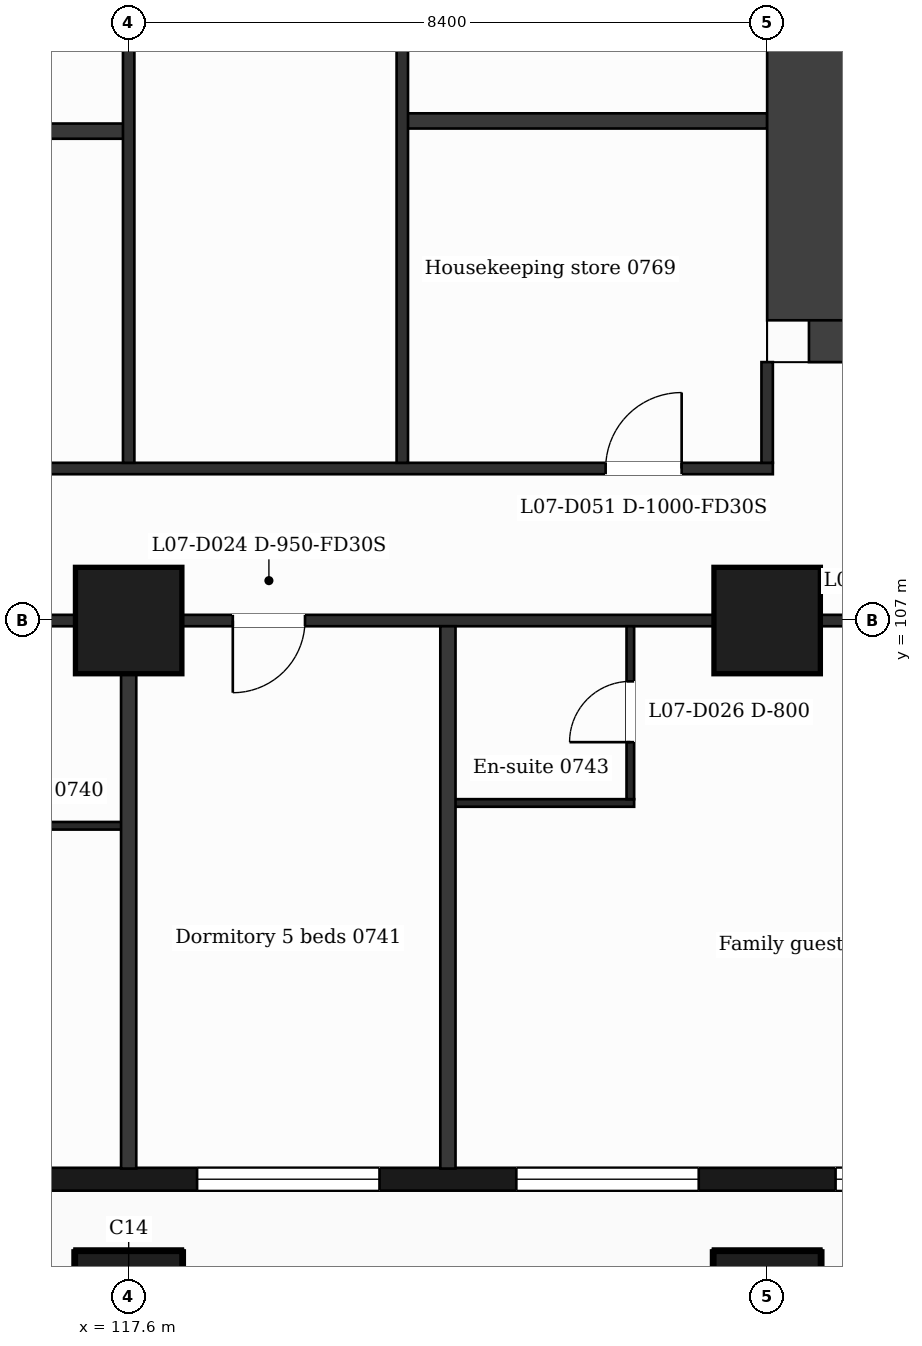
"""IFC4 building model, lengths in metres.
Left out: names, types, materials, properties, quantities, classifications, styles, units other than length and angle.
Written with IfcOpenShell. Run it as: python <this file> out.ifc"""

import sys

from ifc_helpers import new_model, si_unit, direction, frame, frame_2d, origin, origin_2d, place, context, subcontext, project, spatial, rectangle, extrude, element, fill, save


model = new_model("IFC4")
c1 = context("Model", 3, precision=1e-05, world=origin(), true_north=direction((0.0, 1.0)))
c2 = subcontext(c1, "Body", "Model", "MODEL_VIEW")
j1 = project(units=[si_unit("LENGTHUNIT", "METRE"), si_unit("PLANEANGLEUNIT", "RADIAN")], contexts=[c1])
p1 = place(None, origin())
s1 = spatial("IfcSite", under=j1, at=p1, CompositionType="ELEMENT")
p2 = place(p1, origin())
s2 = spatial("IfcBuilding", under=s1, at=p2, CompositionType="ELEMENT")
p3 = place(p2, frame((0.0, 0.0, 42.5)))
s3 = spatial("IfcBuildingStorey", under=s2, at=p3, CompositionType="ELEMENT", Elevation=42.5)
p4 = place(p3, frame((140.502, 110.95, 0.0), z_axis=(0.0, 0.0, 1.0), x_axis=(-1.0, 0.0, 0.0)))
e1 = element("IfcWall", 1, at=p4, inside=s3, PredefinedType="SHEAR", context=c2, shape_type="SweptSolid", body=[
    extrude(rectangle(XDim=13.952, YDim=1.1, at=frame_2d((6.976, 0.0))), origin(), (0.0, 0.0, 1.0), 3.5),
])
p5 = place(p4, frame((6.804, 0.0, 0.0)))
e2 = element("IfcOpeningElement", 2, at=p5, cuts=e1, PredefinedType="OPENING", context=c2, shape_type="SweptSolid", body=[
    extrude(rectangle(XDim=1.4, YDim=2.1, at=frame_2d((0.7, 1.05))), frame((0.0, 0.56, 0.0), z_axis=(0.0, -1.0, 0.0), x_axis=(1.0, 0.0, 0.0)), (0.0, 0.0, 1.0), 1.12),
])
p6 = place(p3, frame((126.55, 110.95, 0.0), z_axis=(0.0, 0.0, 1.0), x_axis=(0.0, 1.0, 0.0)))
e3 = element("IfcWall", 3, at=p6, inside=s3, PredefinedType="SHEAR", context=c2, shape_type="SweptSolid", body=[
    extrude(rectangle(XDim=20.9, YDim=1.1, at=frame_2d((10.45, 0.0))), origin(), (0.0, 0.0, 1.0), 3.5),
])
p7 = place(p6, frame((11.8, 0.0, 0.0)))
e4 = element("IfcOpeningElement", 4, at=p7, cuts=e3, PredefinedType="OPENING", context=c2, shape_type="SweptSolid", body=[
    extrude(rectangle(XDim=1.4, YDim=2.1, at=frame_2d((0.7, 1.05))), frame((0.0, 0.56, 0.0), z_axis=(0.0, -1.0, 0.0), x_axis=(1.0, 0.0, 0.0)), (0.0, 0.0, 1.0), 1.12),
])
for number, where, z_axis, x_axis in (
    (5, (117.6, 98.0, 0.0), (0.0, 0.0, 1.0), (1.0, 0.0, 0.0)),
    (6, (126.0, 98.0, 0.0), (0.0, 0.0, 1.0), (1.0, 0.0, 0.0)),
    (7, (117.6, 107.0, 0.0), (0.0, 0.0, 1.0), (1.0, 0.0, 0.0)),
    (8, (126.0, 107.0, 0.0), (0.0, 0.0, 1.0), (1.0, 0.0, 0.0)),
):
    element("IfcColumn", number, at=place(p3, frame(where, z_axis=z_axis, x_axis=x_axis)), inside=s3, PredefinedType="COLUMN", context=c2, shape_type="SweptSolid", body=[
        extrude(rectangle(XDim=1.4, YDim=1.4, at=origin_2d()), origin(), (0.0, 0.0, 1.0), 3.5),
    ])
p8 = place(p3, frame((89.85, 99.65, 0.0), z_axis=(0.0, 0.0, 1.0), x_axis=(1.0, 0.0, 0.0)))
e9 = element("IfcWall", 9, at=p8, inside=s3, PredefinedType="SOLIDWALL", context=c2, shape_type="SweptSolid", body=[
    extrude(rectangle(XDim=47.25, YDim=0.3, at=frame_2d((23.625, 0.0))), origin(), (0.0, 0.0, 1.0), 3.18),
])
p9 = place(p8, frame((0.725, 0.0, 0.9)))
e10 = element("IfcOpeningElement", 10, at=p9, cuts=e9, PredefinedType="OPENING", context=c2, shape_type="SweptSolid", body=[
    extrude(rectangle(XDim=1.2, YDim=2.1, at=frame_2d((0.6, 1.05))), frame((0.0, 0.16, 0.0), z_axis=(0.0, -1.0, 0.0), x_axis=(1.0, 0.0, 0.0)), (0.0, 0.0, 1.0), 0.32),
])
p10 = place(p8, frame((3.45, 0.0, 0.9)))
e11 = element("IfcOpeningElement", 11, at=p10, cuts=e9, PredefinedType="OPENING", context=c2, shape_type="SweptSolid", body=[
    extrude(rectangle(XDim=2.4, YDim=2.1, at=frame_2d((1.2, 1.05))), frame((0.0, 0.16, 0.0), z_axis=(0.0, -1.0, 0.0), x_axis=(1.0, 0.0, 0.0)), (0.0, 0.0, 1.0), 0.32),
])
p11 = place(p8, frame((7.35, 0.0, 0.0)))
e12 = element("IfcOpeningElement", 12, at=p11, cuts=e9, PredefinedType="OPENING", context=c2, shape_type="SweptSolid", body=[
    extrude(rectangle(XDim=1.2, YDim=2.4, at=frame_2d((0.6, 1.2))), frame((0.0, 0.16, 0.0), z_axis=(0.0, -1.0, 0.0), x_axis=(1.0, 0.0, 0.0)), (0.0, 0.0, 1.0), 0.32),
])
p12 = place(p8, frame((9.15, 0.0, 0.9)))
e13 = element("IfcOpeningElement", 13, at=p12, cuts=e9, PredefinedType="OPENING", context=c2, shape_type="SweptSolid", body=[
    extrude(rectangle(XDim=1.2, YDim=2.1, at=frame_2d((0.6, 1.05))), frame((0.0, 0.16, 0.0), z_axis=(0.0, -1.0, 0.0), x_axis=(1.0, 0.0, 0.0)), (0.0, 0.0, 1.0), 0.32),
])
p13 = place(p8, frame((11.85, 0.0, 0.9)))
e14 = element("IfcOpeningElement", 14, at=p13, cuts=e9, PredefinedType="OPENING", context=c2, shape_type="SweptSolid", body=[
    extrude(rectangle(XDim=2.4, YDim=2.1, at=frame_2d((1.2, 1.05))), frame((0.0, 0.16, 0.0), z_axis=(0.0, -1.0, 0.0), x_axis=(1.0, 0.0, 0.0)), (0.0, 0.0, 1.0), 0.32),
])
p14 = place(p8, frame((16.05, 0.0, 0.9)))
e15 = element("IfcOpeningElement", 15, at=p14, cuts=e9, PredefinedType="OPENING", context=c2, shape_type="SweptSolid", body=[
    extrude(rectangle(XDim=2.4, YDim=2.1, at=frame_2d((1.2, 1.05))), frame((0.0, 0.16, 0.0), z_axis=(0.0, -1.0, 0.0), x_axis=(1.0, 0.0, 0.0)), (0.0, 0.0, 1.0), 0.32),
])
p15 = place(p8, frame((20.85, 0.0, 0.9)))
e16 = element("IfcOpeningElement", 16, at=p15, cuts=e9, PredefinedType="OPENING", context=c2, shape_type="SweptSolid", body=[
    extrude(rectangle(XDim=1.2, YDim=2.1, at=frame_2d((0.6, 1.05))), frame((0.0, 0.16, 0.0), z_axis=(0.0, -1.0, 0.0), x_axis=(1.0, 0.0, 0.0)), (0.0, 0.0, 1.0), 0.32),
])
p16 = place(p8, frame((25.05, 0.0, 0.9)))
e17 = element("IfcOpeningElement", 17, at=p16, cuts=e9, PredefinedType="OPENING", context=c2, shape_type="SweptSolid", body=[
    extrude(rectangle(XDim=1.2, YDim=2.1, at=frame_2d((0.6, 1.05))), frame((0.0, 0.16, 0.0), z_axis=(0.0, -1.0, 0.0), x_axis=(1.0, 0.0, 0.0)), (0.0, 0.0, 1.0), 0.32),
])
p17 = place(p8, frame((28.65, 0.0, 0.9)))
e18 = element("IfcOpeningElement", 18, at=p17, cuts=e9, PredefinedType="OPENING", context=c2, shape_type="SweptSolid", body=[
    extrude(rectangle(XDim=2.4, YDim=2.1, at=frame_2d((1.2, 1.05))), frame((0.0, 0.16, 0.0), z_axis=(0.0, -1.0, 0.0), x_axis=(1.0, 0.0, 0.0)), (0.0, 0.0, 1.0), 0.32),
])
p18 = place(p8, frame((32.85, 0.0, 0.9)))
e19 = element("IfcOpeningElement", 19, at=p18, cuts=e9, PredefinedType="OPENING", context=c2, shape_type="SweptSolid", body=[
    extrude(rectangle(XDim=2.4, YDim=2.1, at=frame_2d((1.2, 1.05))), frame((0.0, 0.16, 0.0), z_axis=(0.0, -1.0, 0.0), x_axis=(1.0, 0.0, 0.0)), (0.0, 0.0, 1.0), 0.32),
])
p19 = place(p8, frame((37.05, 0.0, 0.9)))
e20 = element("IfcOpeningElement", 20, at=p19, cuts=e9, PredefinedType="OPENING", context=c2, shape_type="SweptSolid", body=[
    extrude(rectangle(XDim=2.4, YDim=2.1, at=frame_2d((1.2, 1.05))), frame((0.0, 0.16, 0.0), z_axis=(0.0, -1.0, 0.0), x_axis=(1.0, 0.0, 0.0)), (0.0, 0.0, 1.0), 0.32),
])
p20 = place(p8, frame((41.25, 0.0, 0.9)))
e21 = element("IfcOpeningElement", 21, at=p20, cuts=e9, PredefinedType="OPENING", context=c2, shape_type="SweptSolid", body=[
    extrude(rectangle(XDim=2.4, YDim=2.1, at=frame_2d((1.2, 1.05))), frame((0.0, 0.16, 0.0), z_axis=(0.0, -1.0, 0.0), x_axis=(1.0, 0.0, 0.0)), (0.0, 0.0, 1.0), 0.32),
])
p21 = place(p8, frame((45.25, 0.0, 0.9)))
e22 = element("IfcOpeningElement", 22, at=p21, cuts=e9, PredefinedType="OPENING", context=c2, shape_type="SweptSolid", body=[
    extrude(rectangle(XDim=1.2, YDim=2.1, at=frame_2d((0.6, 1.05))), frame((0.0, 0.16, 0.0), z_axis=(0.0, -1.0, 0.0), x_axis=(1.0, 0.0, 0.0)), (0.0, 0.0, 1.0), 0.32),
])
p22 = place(p3, frame((115.15, 104.3, 0.0), z_axis=(0.0, 0.0, 1.0), x_axis=(1.0, 0.0, 0.0)))
e23 = element("IfcWall", 23, at=p22, inside=s3, PredefinedType="PARTITIONING", context=c2, shape_type="SweptSolid", body=[
    extrude(rectangle(XDim=2.45, YDim=0.1, at=frame_2d((1.225, 0.0))), origin(), (0.0, 0.0, 1.0), 3.18),
])
p23 = place(p3, frame((121.8, 104.6, 0.0), z_axis=(0.0, 0.0, 1.0), x_axis=(1.0, 0.0, 0.0)))
e24 = element("IfcWall", 24, at=p23, inside=s3, PredefinedType="PARTITIONING", context=c2, shape_type="SweptSolid", body=[
    extrude(rectangle(XDim=2.45, YDim=0.1, at=frame_2d((1.225, 0.0))), origin(), (0.0, 0.0, 1.0), 3.18),
])
p24 = place(p3, frame((87.018, 107.0, 0.0), z_axis=(0.0, 0.0, 1.0), x_axis=(1.0, 0.0, 0.0)))
e25 = element("IfcWall", 25, at=p24, inside=s3, PredefinedType="PARTITIONING", context=c2, shape_type="SweptSolid", body=[
    extrude(rectangle(XDim=52.765, YDim=0.15, at=frame_2d((26.382, 0.0))), origin(), (0.0, 0.0, 1.0), 3.18),
])
p25 = place(p24, frame((1.032, 0.0, 0.0)))
e26 = element("IfcOpeningElement", 26, at=p25, cuts=e25, PredefinedType="OPENING", context=c2, shape_type="SweptSolid", body=[
    extrude(rectangle(XDim=0.95, YDim=2.1, at=frame_2d((0.475, 1.05))), frame((0.0, 0.085, 0.0), z_axis=(0.0, -1.0, 0.0), x_axis=(1.0, 0.0, 0.0)), (0.0, 0.0, 1.0), 0.17),
])
p26 = place(p24, frame((6.369, 0.0, 0.0)))
e27 = element("IfcOpeningElement", 27, at=p26, cuts=e25, PredefinedType="OPENING", context=c2, shape_type="SweptSolid", body=[
    extrude(rectangle(XDim=0.95, YDim=2.1, at=frame_2d((0.475, 1.05))), frame((0.0, 0.085, 0.0), z_axis=(0.0, -1.0, 0.0), x_axis=(1.0, 0.0, 0.0)), (0.0, 0.0, 1.0), 0.17),
])
p27 = place(p24, frame((10.952, 0.0, 0.0)))
e28 = element("IfcOpeningElement", 28, at=p27, cuts=e25, PredefinedType="OPENING", context=c2, shape_type="SweptSolid", body=[
    extrude(rectangle(XDim=0.95, YDim=2.1, at=frame_2d((0.475, 1.05))), frame((0.0, 0.085, 0.0), z_axis=(0.0, -1.0, 0.0), x_axis=(1.0, 0.0, 0.0)), (0.0, 0.0, 1.0), 0.17),
])
p28 = place(p24, frame((16.045, 0.0, 0.0)))
e29 = element("IfcOpeningElement", 29, at=p28, cuts=e25, PredefinedType="OPENING", context=c2, shape_type="SweptSolid", body=[
    extrude(rectangle(XDim=0.95, YDim=2.1, at=frame_2d((0.475, 1.05))), frame((0.0, 0.085, 0.0), z_axis=(0.0, -1.0, 0.0), x_axis=(1.0, 0.0, 0.0)), (0.0, 0.0, 1.0), 0.17),
])
p29 = place(p24, frame((20.245, 0.0, 0.0)))
e30 = element("IfcOpeningElement", 30, at=p29, cuts=e25, PredefinedType="OPENING", context=c2, shape_type="SweptSolid", body=[
    extrude(rectangle(XDim=0.95, YDim=2.1, at=frame_2d((0.475, 1.05))), frame((0.0, 0.085, 0.0), z_axis=(0.0, -1.0, 0.0), x_axis=(1.0, 0.0, 0.0)), (0.0, 0.0, 1.0), 0.17),
])
p30 = place(p24, frame((24.969, 0.0, 0.0)))
e31 = element("IfcOpeningElement", 31, at=p30, cuts=e25, PredefinedType="OPENING", context=c2, shape_type="SweptSolid", body=[
    extrude(rectangle(XDim=0.95, YDim=2.1, at=frame_2d((0.475, 1.05))), frame((0.0, 0.085, 0.0), z_axis=(0.0, -1.0, 0.0), x_axis=(1.0, 0.0, 0.0)), (0.0, 0.0, 1.0), 0.17),
])
p31 = place(p24, frame((26.807, 0.0, 0.0)))
e32 = element("IfcOpeningElement", 32, at=p31, cuts=e25, PredefinedType="OPENING", context=c2, shape_type="SweptSolid", body=[
    extrude(rectangle(XDim=0.95, YDim=2.1, at=frame_2d((0.475, 1.05))), frame((0.0, 0.085, 0.0), z_axis=(0.0, -1.0, 0.0), x_axis=(1.0, 0.0, 0.0)), (0.0, 0.0, 1.0), 0.17),
])
p32 = place(p24, frame((31.952, 0.0, 0.0)))
e33 = element("IfcOpeningElement", 33, at=p32, cuts=e25, PredefinedType="OPENING", context=c2, shape_type="SweptSolid", body=[
    extrude(rectangle(XDim=0.95, YDim=2.1, at=frame_2d((0.475, 1.05))), frame((0.0, 0.085, 0.0), z_axis=(0.0, -1.0, 0.0), x_axis=(1.0, 0.0, 0.0)), (0.0, 0.0, 1.0), 0.17),
])
p33 = place(p24, frame((40.795, 0.0, 0.0)))
e34 = element("IfcOpeningElement", 34, at=p33, cuts=e25, PredefinedType="OPENING", context=c2, shape_type="SweptSolid", body=[
    extrude(rectangle(XDim=0.95, YDim=2.1, at=frame_2d((0.475, 1.05))), frame((0.0, 0.085, 0.0), z_axis=(0.0, -1.0, 0.0), x_axis=(1.0, 0.0, 0.0)), (0.0, 0.0, 1.0), 0.17),
])
p34 = place(p24, frame((43.644, 0.0, 0.0)))
e35 = element("IfcOpeningElement", 35, at=p34, cuts=e25, PredefinedType="OPENING", context=c2, shape_type="SweptSolid", body=[
    extrude(rectangle(XDim=0.95, YDim=2.1, at=frame_2d((0.475, 1.05))), frame((0.0, 0.085, 0.0), z_axis=(0.0, -1.0, 0.0), x_axis=(1.0, 0.0, 0.0)), (0.0, 0.0, 1.0), 0.17),
])
p35 = place(p24, frame((48.767, 0.0, 0.0)))
e36 = element("IfcOpeningElement", 36, at=p35, cuts=e25, PredefinedType="OPENING", context=c2, shape_type="SweptSolid", body=[
    extrude(rectangle(XDim=0.95, YDim=2.1, at=frame_2d((0.475, 1.05))), frame((0.0, 0.085, 0.0), z_axis=(0.0, -1.0, 0.0), x_axis=(1.0, 0.0, 0.0)), (0.0, 0.0, 1.0), 0.17),
])
p36 = place(p3, frame((100.725, 109.0, 0.0), z_axis=(0.0, 0.0, 1.0), x_axis=(1.0, 0.0, 0.0)))
e37 = element("IfcWall", 37, at=p36, inside=s3, PredefinedType="PARTITIONING", context=c2, shape_type="SweptSolid", body=[
    extrude(rectangle(XDim=25.35, YDim=0.15, at=frame_2d((12.675, 0.0))), origin(), (0.0, 0.0, 1.0), 3.18),
])
p37 = place(p36, frame((1.2, 0.0, 0.0)))
e38 = element("IfcOpeningElement", 38, at=p37, cuts=e37, PredefinedType="OPENING", context=c2, shape_type="SweptSolid", body=[
    extrude(rectangle(XDim=1.0, YDim=2.1, at=frame_2d((0.5, 1.05))), frame((0.0, 0.085, 0.0), z_axis=(0.0, -1.0, 0.0), x_axis=(1.0, 0.0, 0.0)), (0.0, 0.0, 1.0), 0.17),
])
p38 = place(p36, frame((12.845, 0.0, 0.0)))
e39 = element("IfcOpeningElement", 39, at=p38, cuts=e37, PredefinedType="OPENING", context=c2, shape_type="SweptSolid", body=[
    extrude(rectangle(XDim=1.0, YDim=2.1, at=frame_2d((0.5, 1.05))), frame((0.0, 0.085, 0.0), z_axis=(0.0, -1.0, 0.0), x_axis=(1.0, 0.0, 0.0)), (0.0, 0.0, 1.0), 0.17),
])
p39 = place(p36, frame((23.15, 0.0, 0.0)))
e40 = element("IfcOpeningElement", 40, at=p39, cuts=e37, PredefinedType="OPENING", context=c2, shape_type="SweptSolid", body=[
    extrude(rectangle(XDim=1.0, YDim=2.1, at=frame_2d((0.5, 1.05))), frame((0.0, 0.085, 0.0), z_axis=(0.0, -1.0, 0.0), x_axis=(1.0, 0.0, 0.0)), (0.0, 0.0, 1.0), 0.17),
])
p40 = place(p3, frame((109.2, 113.438, 0.0), z_axis=(0.0, 0.0, 1.0), x_axis=(1.0, 0.0, 0.0)))
e41 = element("IfcWall", 41, at=p40, inside=s3, PredefinedType="PARTITIONING", context=c2, shape_type="SweptSolid", body=[
    extrude(rectangle(XDim=8.4, YDim=0.2, at=frame_2d((4.2, 0.0))), origin(), (0.0, 0.0, 1.0), 3.18),
])
p41 = place(p3, frame((121.2, 113.573, 0.0), z_axis=(0.0, 0.0, 1.0), x_axis=(1.0, 0.0, 0.0)))
e42 = element("IfcWall", 42, at=p41, inside=s3, PredefinedType="PARTITIONING", context=c2, shape_type="SweptSolid", body=[
    extrude(rectangle(XDim=4.8, YDim=0.2, at=frame_2d((2.4, 0.0))), origin(), (0.0, 0.0, 1.0), 3.18),
])
p42 = place(p3, frame((117.6, 99.79, 0.0), z_axis=(0.0, 0.0, 1.0), x_axis=(0.0, 1.0, 0.0)))
e43 = element("IfcWall", 43, at=p42, inside=s3, PredefinedType="PARTITIONING", context=c2, shape_type="SweptSolid", body=[
    extrude(rectangle(XDim=7.135, YDim=0.2, at=frame_2d((3.567, 0.0))), origin(), (0.0, 0.0, 1.0), 3.18),
])
p43 = place(p3, frame((117.6, 109.075, 0.0), z_axis=(0.0, 0.0, 1.0), x_axis=(0.0, 1.0, 0.0)))
e44 = element("IfcWall", 44, at=p43, inside=s3, PredefinedType="PARTITIONING", context=c2, shape_type="SweptSolid", body=[
    extrude(rectangle(XDim=13.3, YDim=0.15, at=frame_2d((6.65, 0.0))), origin(), (0.0, 0.0, 1.0), 3.18),
])
p44 = place(p43, frame((9.1, 0.0, 0.0)))
e45 = element("IfcOpeningElement", 45, at=p44, cuts=e44, PredefinedType="OPENING", context=c2, shape_type="SweptSolid", body=[
    extrude(rectangle(XDim=1.0, YDim=2.1, at=frame_2d((0.5, 1.05))), frame((0.0, 0.085, 0.0), z_axis=(0.0, -1.0, 0.0), x_axis=(1.0, 0.0, 0.0)), (0.0, 0.0, 1.0), 0.17),
])
p45 = place(p3, frame((121.2, 109.075, 0.0), z_axis=(0.0, 0.0, 1.0), x_axis=(0.0, 1.0, 0.0)))
e46 = element("IfcWall", 46, at=p45, inside=s3, PredefinedType="PARTITIONING", context=c2, shape_type="SweptSolid", body=[
    extrude(rectangle(XDim=13.3, YDim=0.15, at=frame_2d((6.65, 0.0))), origin(), (0.0, 0.0, 1.0), 3.18),
])
p46 = place(p45, frame((9.154, 0.0, 0.0)))
e47 = element("IfcOpeningElement", 47, at=p46, cuts=e46, PredefinedType="OPENING", context=c2, shape_type="SweptSolid", body=[
    extrude(rectangle(XDim=1.0, YDim=2.1, at=frame_2d((0.5, 1.05))), frame((0.0, 0.085, 0.0), z_axis=(0.0, -1.0, 0.0), x_axis=(1.0, 0.0, 0.0)), (0.0, 0.0, 1.0), 0.17),
])
p47 = place(p3, frame((121.8, 99.79, 0.0), z_axis=(0.0, 0.0, 1.0), x_axis=(0.0, 1.0, 0.0)))
e48 = element("IfcWall", 48, at=p47, inside=s3, PredefinedType="PARTITIONING", context=c2, shape_type="SweptSolid", body=[
    extrude(rectangle(XDim=7.135, YDim=0.2, at=frame_2d((3.567, 0.0))), origin(), (0.0, 0.0, 1.0), 3.18),
])
p48 = place(p3, frame((124.2, 104.65, 0.0), z_axis=(0.0, 0.0, 1.0), x_axis=(0.0, 1.0, 0.0)))
e49 = element("IfcWall", 49, at=p48, inside=s3, PredefinedType="PARTITIONING", context=c2, shape_type="SweptSolid", body=[
    extrude(rectangle(XDim=2.275, YDim=0.1, at=frame_2d((1.138, 0.0))), origin(), (0.0, 0.0, 1.0), 3.18),
])
p49 = place(p48, frame((0.75, 0.0, 0.0)))
e50 = element("IfcOpeningElement", 50, at=p49, cuts=e49, PredefinedType="OPENING", context=c2, shape_type="SweptSolid", body=[
    extrude(rectangle(XDim=0.8, YDim=2.1, at=frame_2d((0.4, 1.05))), frame((0.0, 0.06, 0.0), z_axis=(0.0, -1.0, 0.0), x_axis=(1.0, 0.0, 0.0)), (0.0, 0.0, 1.0), 0.12),
])
p50 = place(p3, frame((126.0, 109.075, 0.0), z_axis=(0.0, 0.0, 1.0), x_axis=(0.0, 1.0, 0.0)))
e51 = element("IfcWall", 51, at=p50, inside=s3, PredefinedType="PARTITIONING", context=c2, shape_type="SweptSolid", body=[
    extrude(rectangle(XDim=1.325, YDim=0.15, at=frame_2d((0.663, 0.0))), origin(), (0.0, 0.0, 1.0), 3.18),
])
p51 = place(p17, origin())
e52 = element("IfcWindow", 52, at=p51, inside=s3, PartitioningType="SINGLE_PANEL", PredefinedType="WINDOW", context=c2, shape_type="SweptSolid", body=[
    extrude(rectangle(XDim=2.4, YDim=2.1, at=frame_2d((1.2, 1.05))), frame((0.0, 0.03, 0.0), z_axis=(0.0, -1.0, 0.0), x_axis=(1.0, 0.0, 0.0)), (0.0, 0.0, 1.0), 0.06),
])
fill(e18, e52)
p52 = place(p18, origin())
e53 = element("IfcWindow", 53, at=p52, inside=s3, PartitioningType="SINGLE_PANEL", PredefinedType="WINDOW", context=c2, shape_type="SweptSolid", body=[
    extrude(rectangle(XDim=2.4, YDim=2.1, at=frame_2d((1.2, 1.05))), frame((0.0, 0.03, 0.0), z_axis=(0.0, -1.0, 0.0), x_axis=(1.0, 0.0, 0.0)), (0.0, 0.0, 1.0), 0.06),
])
fill(e19, e53)
p53 = place(p19, origin())
e54 = element("IfcWindow", 54, at=p53, inside=s3, PartitioningType="SINGLE_PANEL", PredefinedType="WINDOW", context=c2, shape_type="SweptSolid", body=[
    extrude(rectangle(XDim=2.4, YDim=2.1, at=frame_2d((1.2, 1.05))), frame((0.0, 0.03, 0.0), z_axis=(0.0, -1.0, 0.0), x_axis=(1.0, 0.0, 0.0)), (0.0, 0.0, 1.0), 0.06),
])
fill(e20, e54)
p54 = place(p32, origin())
e55 = element("IfcDoor", 55, at=p54, inside=s3, OperationType="SINGLE_SWING_LEFT", PredefinedType="DOOR", context=c2, shape_type="SweptSolid", body=[
    extrude(rectangle(XDim=0.95, YDim=2.1, at=frame_2d((0.475, 1.05))), frame((0.0, 0.025, 0.0), z_axis=(0.0, -1.0, 0.0), x_axis=(1.0, 0.0, 0.0)), (0.0, 0.0, 1.0), 0.05),
])
fill(e33, e55)
p55 = place(p49, origin())
e56 = element("IfcDoor", 56, at=p55, inside=s3, OperationType="SINGLE_SWING_LEFT", PredefinedType="DOOR", context=c2, shape_type="SweptSolid", body=[
    extrude(rectangle(XDim=0.8, YDim=2.1, at=frame_2d((0.4, 1.05))), frame((0.0, 0.025, 0.0), z_axis=(0.0, -1.0, 0.0), x_axis=(1.0, 0.0, 0.0)), (0.0, 0.0, 1.0), 0.05),
])
fill(e50, e56)
p56 = place(p39, origin())
e57 = element("IfcDoor", 57, at=p56, inside=s3, OperationType="SINGLE_SWING_RIGHT", PredefinedType="DOOR", context=c2, shape_type="SweptSolid", body=[
    extrude(rectangle(XDim=1.0, YDim=2.1, at=frame_2d((0.5, 1.05))), frame((0.0, 0.025, 0.0), z_axis=(0.0, -1.0, 0.0), x_axis=(1.0, 0.0, 0.0)), (0.0, 0.0, 1.0), 0.05),
])
fill(e40, e57)
save(model, sys.argv[1])
